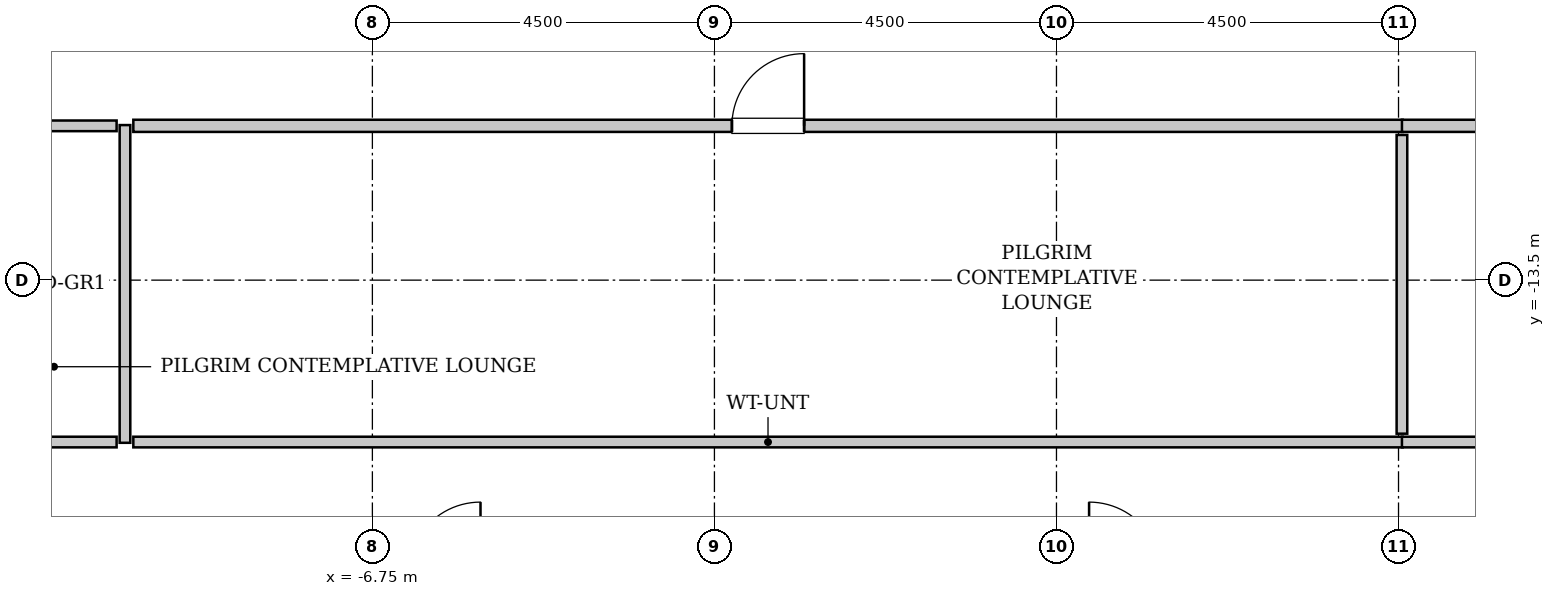
"""IFC4 building model, lengths in metres.
Left out: names, types, materials, properties, quantities, classifications, styles, units other than length and angle.
Written with IfcOpenShell. Run it as: python <this file> out.ifc"""

import sys

from ifc_helpers import new_model, si_unit, direction, frame, frame_2d, origin, place, context, subcontext, project, spatial, rectangle, extrude, source, transform, mapped, element, fill, save


model = new_model("IFC4")
c1 = context("Model", 3, precision=1e-05, world=origin(), true_north=direction((0.0, 1.0)))
c2 = subcontext(c1, "Body", "Model", "MODEL_VIEW")
j1 = project(units=[si_unit("LENGTHUNIT", "METRE"), si_unit("PLANEANGLEUNIT", "RADIAN")], contexts=[c1])
p1 = place(None, origin())
s1 = spatial("IfcSite", under=j1, at=p1, CompositionType="ELEMENT")
p2 = place(p1, origin())
s2 = spatial("IfcBuilding", under=s1, at=p2, CompositionType="ELEMENT")
p3 = place(p2, frame((0.0, 0.0, 256.0)))
s3 = spatial("IfcBuildingStorey", under=s2, at=p3, CompositionType="ELEMENT", Elevation=256.0)
m1 = source(origin(), c2, "Body", "SweptSolid", [
    extrude(rectangle(XDim=4.18, YDim=0.14, at=frame_2d((2.09, 0.0))), origin(), (0.0, 0.0, 1.0), 3.485),
])
p4 = place(p3, frame((-10.005, -15.64, 0.0), z_axis=(0.0, 0.0, 1.0), x_axis=(0.0, 1.0, 0.0)))
e1 = element("IfcWall", 1, at=p4, inside=s3, PredefinedType="PARTITIONING", context=c2, shape_type="MappedRepresentation", body=[
    mapped(m1, transform((0.0, 0.0, 0.0), x_axis=(1.0, 0.0, 0.0), y_axis=(0.0, 1.0, 0.0), z_axis=(0.0, 0.0, 1.0), scale=1.0)),
])
m2 = source(origin(), c2, "Body", "SweptSolid", [
    extrude(rectangle(XDim=1.765, YDim=0.14, at=frame_2d((0.882, 0.0))), origin(), (0.0, 0.0, 1.0), 3.485),
])
for number, where, z_axis, x_axis in (
    (2, (-11.88, -11.47, 0.0), (0.0, 0.0, 1.0), (1.0, 0.0, 0.0)),
    (3, (-11.88, -15.63, 0.0), (0.0, 0.0, 1.0), (1.0, 0.0, 0.0)),
):
    element("IfcWall", number, at=place(p3, frame(where, z_axis=z_axis, x_axis=x_axis)), inside=s3, PredefinedType="PARTITIONING", context=c2, shape_type="MappedRepresentation", body=[
        mapped(m2, transform((0.0, 0.0, 0.0), x_axis=(1.0, 0.0, 0.0), y_axis=(0.0, 1.0, 0.0), z_axis=(0.0, 0.0, 1.0), scale=1.0)),
    ])
m3 = source(origin(), c2, "Body", "SweptSolid", [
    extrude(rectangle(XDim=16.7, YDim=0.16, at=frame_2d((8.35, 0.0))), origin(), (0.0, 0.0, 1.0), 3.485),
])
p5 = place(p3, frame((-9.895, -11.47, 0.0), z_axis=(0.0, 0.0, 1.0), x_axis=(1.0, 0.0, 0.0)))
e4 = element("IfcWall", 4, at=p5, inside=s3, PredefinedType="PARTITIONING", context=c2, shape_type="MappedRepresentation", body=[
    mapped(m3, transform((0.0, 0.0, 0.0), x_axis=(1.0, 0.0, 0.0), y_axis=(0.0, 1.0, 0.0), z_axis=(0.0, 0.0, 1.0), scale=1.0)),
])
p6 = place(p5, frame((7.875, 0.0, 0.0)))
e5 = element("IfcOpeningElement", 5, at=p6, cuts=e4, PredefinedType="OPENING", context=c2, shape_type="SweptSolid", body=[
    extrude(rectangle(XDim=0.95, YDim=2.1, at=frame_2d((0.475, 1.05))), frame((0.0, 0.09, 0.0), z_axis=(0.0, -1.0, 0.0), x_axis=(1.0, 0.0, 0.0)), (0.0, 0.0, 1.0), 0.18),
])
m4 = source(origin(), c2, "Body", "SweptSolid", [
    extrude(rectangle(XDim=16.7, YDim=0.14, at=frame_2d((8.35, 0.0))), origin(), (0.0, 0.0, 1.0), 3.485),
])
p7 = place(p3, frame((-9.895, -15.63, 0.0), z_axis=(0.0, 0.0, 1.0), x_axis=(1.0, 0.0, 0.0)))
e6 = element("IfcWall", 6, at=p7, inside=s3, PredefinedType="PARTITIONING", context=c2, shape_type="MappedRepresentation", body=[
    mapped(m4, transform((0.0, 0.0, 0.0), x_axis=(1.0, 0.0, 0.0), y_axis=(0.0, 1.0, 0.0), z_axis=(0.0, 0.0, 1.0), scale=1.0)),
])
m5 = source(origin(), c2, "Body", "SweptSolid", [
    extrude(rectangle(XDim=3.93, YDim=0.14, at=frame_2d((1.965, 0.0))), origin(), (0.0, 0.0, 1.0), 3.485),
])
p8 = place(p3, frame((6.795, -15.52, 0.0), z_axis=(0.0, 0.0, 1.0), x_axis=(0.0, 1.0, 0.0)))
e7 = element("IfcWall", 7, at=p8, inside=s3, PredefinedType="PARTITIONING", context=c2, shape_type="MappedRepresentation", body=[
    mapped(m5, transform((0.0, 0.0, 0.0), x_axis=(1.0, 0.0, 0.0), y_axis=(0.0, 1.0, 0.0), z_axis=(0.0, 0.0, 1.0), scale=1.0)),
])
m6 = source(origin(), c2, "Body", "SweptSolid", [
    extrude(rectangle(XDim=5.215, YDim=0.16, at=frame_2d((2.607, 0.0))), origin(), (0.0, 0.0, 1.0), 3.485),
])
p9 = place(p3, frame((6.795, -11.47, 0.0), z_axis=(0.0, 0.0, 1.0), x_axis=(1.0, 0.0, 0.0)))
e8 = element("IfcWall", 8, at=p9, inside=s3, PredefinedType="PARTITIONING", context=c2, shape_type="MappedRepresentation", body=[
    mapped(m6, transform((0.0, 0.0, 0.0), x_axis=(1.0, 0.0, 0.0), y_axis=(0.0, 1.0, 0.0), z_axis=(0.0, 0.0, 1.0), scale=1.0)),
])
p10 = place(p9, frame((2.133, 0.0, 0.0)))
e9 = element("IfcOpeningElement", 9, at=p10, cuts=e8, PredefinedType="OPENING", context=c2, shape_type="SweptSolid", body=[
    extrude(rectangle(XDim=0.95, YDim=2.1, at=frame_2d((0.475, 1.05))), frame((0.0, 0.09, 0.0), z_axis=(0.0, -1.0, 0.0), x_axis=(1.0, 0.0, 0.0)), (0.0, 0.0, 1.0), 0.18),
])
m7 = source(origin(), c2, "Body", "SweptSolid", [
    extrude(rectangle(XDim=5.215, YDim=0.14, at=frame_2d((2.607, 0.0))), origin(), (0.0, 0.0, 1.0), 3.485),
])
p11 = place(p3, frame((6.795, -15.63, 0.0), z_axis=(0.0, 0.0, 1.0), x_axis=(1.0, 0.0, 0.0)))
e10 = element("IfcWall", 10, at=p11, inside=s3, PredefinedType="PARTITIONING", context=c2, shape_type="MappedRepresentation", body=[
    mapped(m7, transform((0.0, 0.0, 0.0), x_axis=(1.0, 0.0, 0.0), y_axis=(0.0, 1.0, 0.0), z_axis=(0.0, 0.0, 1.0), scale=1.0)),
])
m8 = source(origin(), c2, "Body", "SweptSolid", [
    extrude(rectangle(XDim=0.95, YDim=2.1, at=frame_2d((0.475, 1.05))), frame((0.0, 0.025, 0.0), z_axis=(0.0, -1.0, 0.0), x_axis=(1.0, 0.0, 0.0)), (0.0, 0.0, 1.0), 0.05),
])
p12 = place(p6, origin())
e11 = element("IfcDoor", 11, at=p12, inside=s3, OperationType="SINGLE_SWING_RIGHT", PredefinedType="DOOR", context=c2, shape_type="MappedRepresentation", body=[
    mapped(m8, transform((0.0, 0.0, 0.0), x_axis=(1.0, 0.0, 0.0), y_axis=(0.0, 1.0, 0.0), z_axis=(0.0, 0.0, 1.0), scale=1.0)),
])
fill(e5, e11)
save(model, sys.argv[1])
